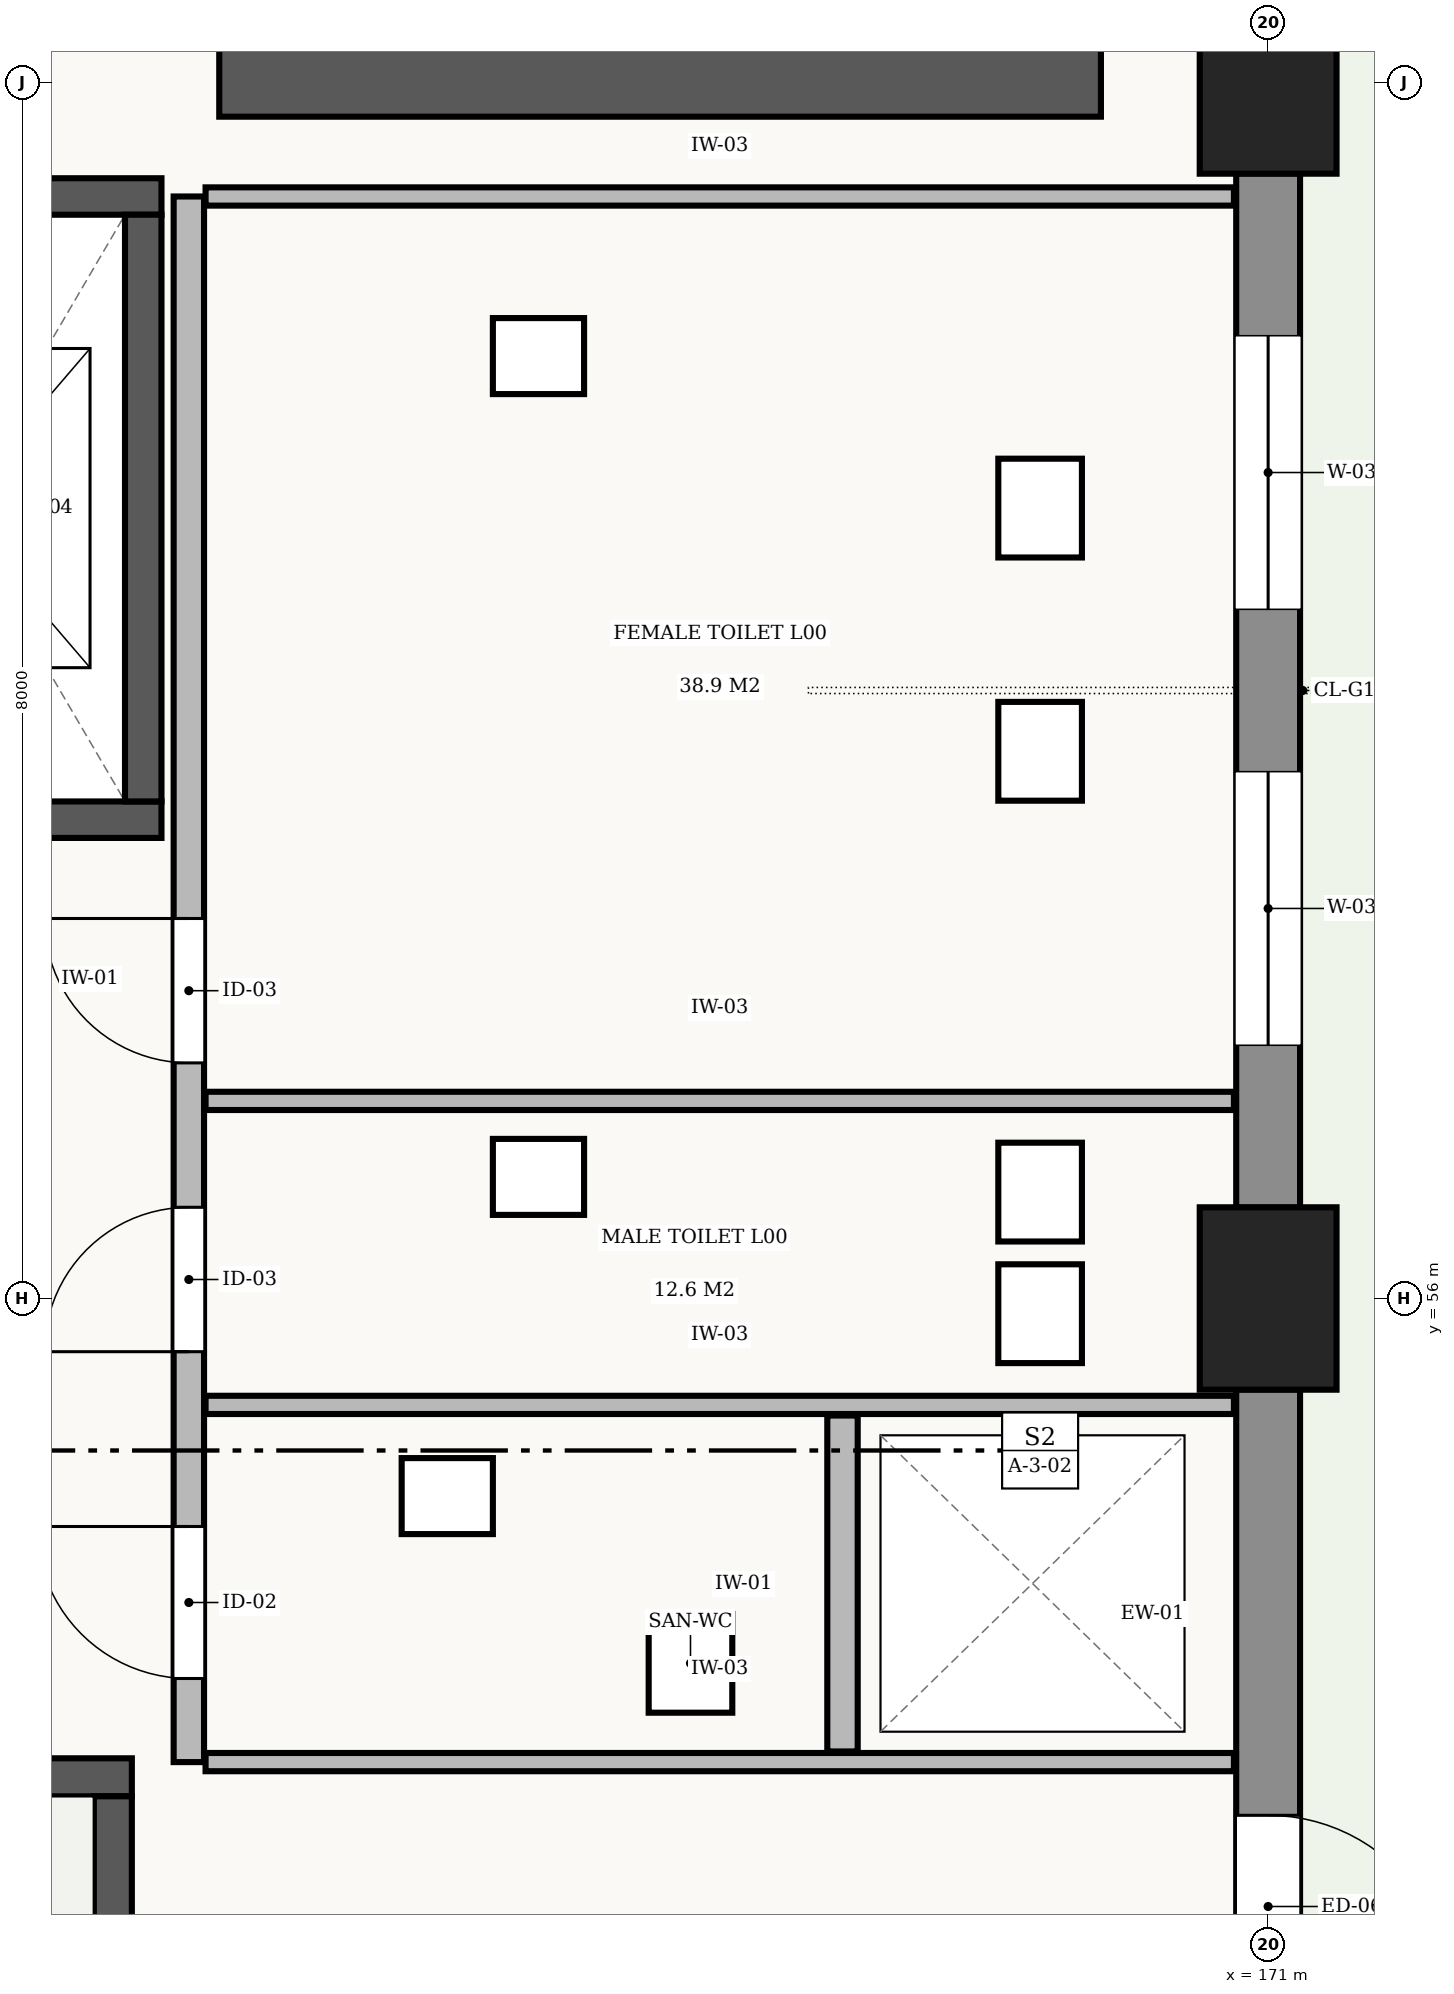
"""IFC4 building model, lengths in metres.
Left out: names, types, materials, properties, quantities, classifications, styles, units other than length and angle.
Written with IfcOpenShell. Run it as: python <this file> out.ifc"""

import sys

from ifc_helpers import new_model, si_unit, direction, frame, frame_2d, origin, origin_2d, place, context, subcontext, project, spatial, rectangle, extrude, element, fill, save


model = new_model("IFC4")
c1 = context("Model", 3, precision=1e-05, world=origin(), true_north=direction((0.0, 1.0)))
c2 = subcontext(c1, "Body", "Model", "MODEL_VIEW")
j1 = project(units=[si_unit("LENGTHUNIT", "METRE"), si_unit("PLANEANGLEUNIT", "RADIAN")], contexts=[c1])
p1 = place(None, origin())
s1 = spatial("IfcSite", under=j1, at=p1, CompositionType="ELEMENT")
p2 = place(p1, origin())
s2 = spatial("IfcBuilding", under=s1, at=p2, CompositionType="ELEMENT")
p3 = place(p2, origin())
s3 = spatial("IfcBuildingStorey", under=s2, at=p3, CompositionType="ELEMENT", Elevation=0.0)
for number, where, z_axis, x_axis in (
    (1, (171.0, 56.0, 0.0), (0.0, 0.0, 1.0), (1.0, 0.0, 0.0)),
    (2, (171.0, 64.0, 0.0), (0.0, 0.0, 1.0), (1.0, 0.0, 0.0)),
):
    element("IfcColumn", number, at=place(p3, frame(where, z_axis=z_axis, x_axis=x_axis)), inside=s3, PredefinedType="COLUMN", context=c2, shape_type="SweptSolid", body=[
        extrude(rectangle(XDim=0.9, YDim=1.2, at=origin_2d()), origin(), (0.0, 0.0, 1.0), 5.4),
    ])
p4 = place(p3, frame((171.0, 63.402, 0.0), z_axis=(0.0, 0.0, 1.0), x_axis=(0.0, -1.0, 0.0)))
e3 = element("IfcWall", 3, at=p4, inside=s3, PredefinedType="STANDARD", context=c2, shape_type="SweptSolid", body=[
    extrude(rectangle(XDim=6.804, YDim=0.42, at=frame_2d((3.402, 0.0))), origin(), (0.0, 0.0, 1.0), 4.38),
])
p5 = place(p4, frame((1.068, 0.0, 0.9)))
e4 = element("IfcOpeningElement", 4, at=p5, cuts=e3, PredefinedType="OPENING", context=c2, shape_type="SweptSolid", body=[
    extrude(rectangle(XDim=1.8, YDim=2.4, at=frame_2d((0.9, 1.2))), frame((0.0, 0.222, 0.0), z_axis=(0.0, -1.0, 0.0), x_axis=(1.0, 0.0, 0.0)), (0.0, 0.0, 1.0), 0.444),
])
p6 = place(p4, frame((3.936, 0.0, 0.9)))
e5 = element("IfcOpeningElement", 5, at=p6, cuts=e3, PredefinedType="OPENING", context=c2, shape_type="SweptSolid", body=[
    extrude(rectangle(XDim=1.8, YDim=2.4, at=frame_2d((0.9, 1.2))), frame((0.0, 0.222, 0.0), z_axis=(0.0, -1.0, 0.0), x_axis=(1.0, 0.0, 0.0)), (0.0, 0.0, 1.0), 0.444),
])
p7 = place(p3, frame((171.0, 55.402, 0.0), z_axis=(0.0, 0.0, 1.0), x_axis=(0.0, -1.0, 0.0)))
e6 = element("IfcWall", 6, at=p7, inside=s3, PredefinedType="STANDARD", context=c2, shape_type="SweptSolid", body=[
    extrude(rectangle(XDim=6.804, YDim=0.42, at=frame_2d((3.402, 0.0))), origin(), (0.0, 0.0, 1.0), 4.38),
])
p8 = place(p7, frame((2.802, 0.0, 0.0)))
e7 = element("IfcOpeningElement", 7, at=p8, cuts=e6, PredefinedType="OPENING", context=c2, shape_type="SweptSolid", body=[
    extrude(rectangle(XDim=1.2, YDim=2.2, at=frame_2d((0.6, 1.1))), frame((0.0, 0.222, 0.0), z_axis=(0.0, -1.0, 0.0), x_axis=(1.0, 0.0, 0.0)), (0.0, 0.0, 1.0), 0.444),
])
p9 = place(p3, frame((163.525, 52.85, 0.0), z_axis=(0.0, 0.0, 1.0), x_axis=(-1.0, 0.0, 0.0)))
e8 = element("IfcWall", 8, at=p9, inside=s3, PredefinedType="SHEAR", context=c2, shape_type="SweptSolid", body=[
    extrude(rectangle(XDim=9.65, YDim=0.25, at=frame_2d((4.825, 0.0))), origin(), (0.0, 0.0, 1.0), 5.05),
])
p10 = place(p9, frame((7.925, 0.0, 0.0)))
e9 = element("IfcOpeningElement", 9, at=p10, cuts=e8, PredefinedType="OPENING", context=c2, shape_type="SweptSolid", body=[
    extrude(rectangle(XDim=1.25, YDim=2.15, at=frame_2d((0.625, 1.075))), frame((0.0, 0.137, 0.0), z_axis=(0.0, -1.0, 0.0), x_axis=(1.0, 0.0, 0.0)), (0.0, 0.0, 1.0), 0.274),
])
p11 = place(p3, frame((163.4, 48.875, 0.0), z_axis=(0.0, 0.0, 1.0), x_axis=(0.0, 1.0, 0.0)))
e10 = element("IfcWall", 10, at=p11, inside=s3, PredefinedType="SHEAR", context=c2, shape_type="SweptSolid", body=[
    extrude(rectangle(XDim=3.85, YDim=0.25, at=frame_2d((1.925, 0.0))), origin(), (0.0, 0.0, 1.0), 5.05),
])
p12 = place(p3, frame((160.975, 59.15, 0.0), z_axis=(0.0, 0.0, 1.0), x_axis=(1.0, 0.0, 0.0)))
e11 = element("IfcWall", 11, at=p12, inside=s3, PredefinedType="SHEAR", context=c2, shape_type="SweptSolid", body=[
    extrude(rectangle(XDim=2.745, YDim=0.24, at=frame_2d((1.373, 0.0))), origin(), (0.0, 0.0, 1.0), 5.05),
])
p13 = place(p12, frame((0.825, 0.0, 0.0)))
e12 = element("IfcOpeningElement", 12, at=p13, cuts=e11, PredefinedType="OPENING", context=c2, shape_type="SweptSolid", body=[
    extrude(rectangle(XDim=1.1, YDim=2.2, at=frame_2d((0.55, 1.1))), frame((0.0, 0.132, 0.0), z_axis=(0.0, -1.0, 0.0), x_axis=(1.0, 0.0, 0.0)), (0.0, 0.0, 1.0), 0.264),
])
p14 = place(p3, frame((163.72, 63.25, 0.0), z_axis=(0.0, 0.0, 1.0), x_axis=(-1.0, 0.0, 0.0)))
e13 = element("IfcWall", 13, at=p14, inside=s3, PredefinedType="SHEAR", context=c2, shape_type="SweptSolid", body=[
    extrude(rectangle(XDim=2.745, YDim=0.24, at=frame_2d((1.373, 0.0))), origin(), (0.0, 0.0, 1.0), 5.05),
])
p15 = place(p3, frame((163.6, 59.27, 0.0), z_axis=(0.0, 0.0, 1.0), x_axis=(0.0, 1.0, 0.0)))
e14 = element("IfcWall", 14, at=p15, inside=s3, PredefinedType="SHEAR", context=c2, shape_type="SweptSolid", body=[
    extrude(rectangle(XDim=3.86, YDim=0.24, at=frame_2d((1.93, 0.0))), origin(), (0.0, 0.0, 1.0), 5.05),
])
p16 = place(p3, frame((164.1, 64.0, 0.0), z_axis=(0.0, 0.0, 1.0), x_axis=(1.0, 0.0, 0.0)))
e15 = element("IfcWall", 15, at=p16, inside=s3, PredefinedType="SHEAR", context=c2, shape_type="SweptSolid", body=[
    extrude(rectangle(XDim=5.8, YDim=0.45, at=frame_2d((2.9, 0.0))), origin(), (0.0, 0.0, 1.0), 4.1),
])
p17 = place(p3, frame((163.9, 52.95, 0.0), z_axis=(0.0, 0.0, 1.0), x_axis=(0.0, 1.0, 0.0)))
e16 = element("IfcWall", 16, at=p17, inside=s3, PredefinedType="STANDARD", context=c2, shape_type="SweptSolid", body=[
    extrude(rectangle(XDim=10.3, YDim=0.2, at=frame_2d((5.15, 0.0))), origin(), (0.0, 0.0, 1.0), 5.05),
])
p18 = place(p17, frame((0.55, 0.0, 0.0)))
e17 = element("IfcOpeningElement", 17, at=p18, cuts=e16, PredefinedType="OPENING", context=c2, shape_type="SweptSolid", body=[
    extrude(rectangle(XDim=1.0, YDim=2.1, at=frame_2d((0.5, 1.05))), frame((0.0, 0.112, 0.0), z_axis=(0.0, -1.0, 0.0), x_axis=(1.0, 0.0, 0.0)), (0.0, 0.0, 1.0), 0.224),
])
p19 = place(p17, frame((2.7, 0.0, 0.0)))
e18 = element("IfcOpeningElement", 18, at=p19, cuts=e16, PredefinedType="OPENING", context=c2, shape_type="SweptSolid", body=[
    extrude(rectangle(XDim=0.95, YDim=2.1, at=frame_2d((0.475, 1.05))), frame((0.0, 0.112, 0.0), z_axis=(0.0, -1.0, 0.0), x_axis=(1.0, 0.0, 0.0)), (0.0, 0.0, 1.0), 0.224),
])
p20 = place(p17, frame((4.6, 0.0, 0.0)))
e19 = element("IfcOpeningElement", 19, at=p20, cuts=e16, PredefinedType="OPENING", context=c2, shape_type="SweptSolid", body=[
    extrude(rectangle(XDim=0.95, YDim=2.1, at=frame_2d((0.475, 1.05))), frame((0.0, 0.112, 0.0), z_axis=(0.0, -1.0, 0.0), x_axis=(1.0, 0.0, 0.0)), (0.0, 0.0, 1.0), 0.224),
])
p21 = place(p3, frame((168.2, 53.02, 0.0), z_axis=(0.0, 0.0, 1.0), x_axis=(0.0, 1.0, 0.0)))
e20 = element("IfcWall", 20, at=p21, inside=s3, PredefinedType="STANDARD", context=c2, shape_type="SweptSolid", body=[
    extrude(rectangle(XDim=2.21, YDim=0.2, at=frame_2d((1.105, 0.0))), origin(), (0.0, 0.0, 1.0), 5.05),
])
for number, where, z_axis, x_axis in (
    (21, (164.01, 52.95, 0.0), (0.0, 0.0, 1.0), (1.0, 0.0, 0.0)),
    (22, (164.01, 55.3, 0.0), (0.0, 0.0, 1.0), (1.0, 0.0, 0.0)),
    (23, (164.01, 57.3, 0.0), (0.0, 0.0, 1.0), (1.0, 0.0, 0.0)),
    (24, (164.01, 63.25, 0.0), (0.0, 0.0, 1.0), (1.0, 0.0, 0.0)),
):
    element("IfcWall", number, at=place(p3, frame(where, z_axis=z_axis, x_axis=x_axis)), inside=s3, PredefinedType="STANDARD", context=c2, shape_type="SweptSolid", body=[
        extrude(rectangle(XDim=6.765, YDim=0.12, at=frame_2d((3.382, 0.0))), origin(), (0.0, 0.0, 1.0), 5.05),
    ])
p22 = place(p5, origin())
e25 = element("IfcWindow", 25, at=p22, inside=s3, PartitioningType="SINGLE_PANEL", PredefinedType="WINDOW", context=c2, shape_type="SweptSolid", body=[
    extrude(rectangle(XDim=1.8, YDim=2.4, at=frame_2d((0.9, 1.2))), frame((0.0, 0.03, 0.0), z_axis=(0.0, -1.0, 0.0), x_axis=(1.0, 0.0, 0.0)), (0.0, 0.0, 1.0), 0.06),
])
fill(e4, e25)
p23 = place(p6, origin())
e26 = element("IfcWindow", 26, at=p23, inside=s3, PartitioningType="SINGLE_PANEL", PredefinedType="WINDOW", context=c2, shape_type="SweptSolid", body=[
    extrude(rectangle(XDim=1.8, YDim=2.4, at=frame_2d((0.9, 1.2))), frame((0.0, 0.03, 0.0), z_axis=(0.0, -1.0, 0.0), x_axis=(1.0, 0.0, 0.0)), (0.0, 0.0, 1.0), 0.06),
])
fill(e5, e26)
p24 = place(p8, origin())
e27 = element("IfcDoor", 27, at=p24, inside=s3, OperationType="SINGLE_SWING_RIGHT", PredefinedType="DOOR", context=c2, shape_type="SweptSolid", body=[
    extrude(rectangle(XDim=1.2, YDim=2.2, at=frame_2d((0.6, 1.1))), frame((0.0, 0.025, 0.0), z_axis=(0.0, -1.0, 0.0), x_axis=(1.0, 0.0, 0.0)), (0.0, 0.0, 1.0), 0.05),
])
fill(e7, e27)
p25 = place(p18, origin())
e28 = element("IfcDoor", 28, at=p25, inside=s3, OperationType="SINGLE_SWING_RIGHT", PredefinedType="DOOR", context=c2, shape_type="SweptSolid", body=[
    extrude(rectangle(XDim=1.0, YDim=2.1, at=frame_2d((0.5, 1.05))), frame((0.0, 0.025, 0.0), z_axis=(0.0, -1.0, 0.0), x_axis=(1.0, 0.0, 0.0)), (0.0, 0.0, 1.0), 0.05),
])
fill(e17, e28)
p26 = place(p19, origin())
e29 = element("IfcDoor", 29, at=p26, inside=s3, OperationType="SINGLE_SWING_LEFT", PredefinedType="DOOR", context=c2, shape_type="SweptSolid", body=[
    extrude(rectangle(XDim=0.95, YDim=2.1, at=frame_2d((0.475, 1.05))), frame((0.0, 0.025, 0.0), z_axis=(0.0, -1.0, 0.0), x_axis=(1.0, 0.0, 0.0)), (0.0, 0.0, 1.0), 0.05),
])
fill(e18, e29)
p27 = place(p20, origin())
e30 = element("IfcDoor", 30, at=p27, inside=s3, OperationType="SINGLE_SWING_RIGHT", PredefinedType="DOOR", context=c2, shape_type="SweptSolid", body=[
    extrude(rectangle(XDim=0.95, YDim=2.1, at=frame_2d((0.475, 1.05))), frame((0.0, 0.025, 0.0), z_axis=(0.0, -1.0, 0.0), x_axis=(1.0, 0.0, 0.0)), (0.0, 0.0, 1.0), 0.05),
])
fill(e19, e30)
save(model, sys.argv[1])
